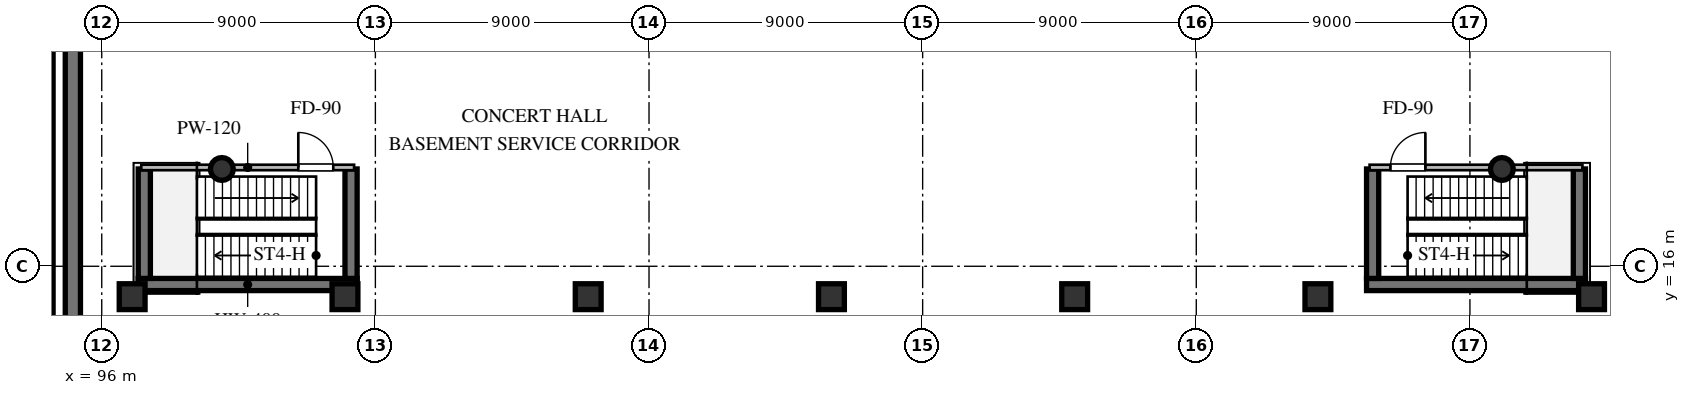
"""IFC4 building model, lengths in metres.
Left out: names, types, materials, properties, quantities, classifications, styles, units other than length and angle.
Written with IfcOpenShell. Run it as: python <this file> out.ifc"""

import sys

from ifc_helpers import new_model, si_unit, direction, frame, frame_2d, origin, origin_2d, place, context, subcontext, project, spatial, rectangle, circle, extrude, element, fill, save


model = new_model("IFC4")
c1 = context("Model", 3, precision=1e-05, world=origin(), true_north=direction((0.0, 1.0)))
c2 = subcontext(c1, "Body", "Model", "MODEL_VIEW")
j1 = project(units=[si_unit("LENGTHUNIT", "METRE"), si_unit("PLANEANGLEUNIT", "RADIAN")], contexts=[c1])
p1 = place(None, origin())
s1 = spatial("IfcSite", under=j1, at=p1, CompositionType="ELEMENT")
p2 = place(p1, origin())
s2 = spatial("IfcBuilding", under=s1, at=p2, CompositionType="ELEMENT")
p3 = place(p2, frame((0.0, 0.0, -5.4)))
s3 = spatial("IfcBuildingStorey", under=s2, at=p3, CompositionType="ELEMENT", Elevation=-5.4)
for number, where, z_axis, x_axis in (
    (1, (94.15, 1.5, 0.0), (0.0, 0.0, 1.0), (0.0, 1.0, 0.0)),
    (2, (95.05, 73.0, 0.0), (0.0, 0.0, 1.0), (0.0, -1.0, 0.0)),
):
    element("IfcWall", number, at=place(p3, frame(where, z_axis=z_axis, x_axis=x_axis)), inside=s3, PredefinedType="SHEAR", context=c2, shape_type="SweptSolid", body=[
        extrude(rectangle(XDim=71.5, YDim=0.5, at=frame_2d((35.75, 0.0))), origin(), (0.0, 0.0, 1.0), 5.2),
    ])
for number, where, z_axis, x_axis in (
    (3, (97.0, 15.0, 0.0), (0.0, 0.0, 1.0), (1.0, 0.0, 0.0)),
    (4, (104.0, 15.0, 0.0), (0.0, 0.0, 1.0), (1.0, 0.0, 0.0)),
    (5, (112.0, 15.0, 0.0), (0.0, 0.0, 1.0), (1.0, 0.0, 0.0)),
    (6, (120.0, 15.0, 0.0), (0.0, 0.0, 1.0), (1.0, 0.0, 0.0)),
    (7, (128.0, 15.0, 0.0), (0.0, 0.0, 1.0), (1.0, 0.0, 0.0)),
    (8, (136.0, 15.0, 0.0), (0.0, 0.0, 1.0), (1.0, 0.0, 0.0)),
    (9, (145.0, 15.0, 0.0), (0.0, 0.0, 1.0), (1.0, 0.0, 0.0)),
):
    element("IfcColumn", number, at=place(p3, frame(where, z_axis=z_axis, x_axis=x_axis)), inside=s3, PredefinedType="COLUMN", context=c2, shape_type="SweptSolid", body=[
        extrude(rectangle(XDim=0.85, YDim=0.85, at=origin_2d()), origin(), (0.0, 0.0, 1.0), 5.4),
    ])
p4 = place(p3, frame((97.2, 15.4, 0.0), z_axis=(0.0, 0.0, 1.0), x_axis=(1.0, 0.0, 0.0)))
e10 = element("IfcWall", 10, at=p4, inside=s3, PredefinedType="SHEAR", context=c2, shape_type="SweptSolid", body=[
    extrude(rectangle(XDim=7.2, YDim=0.4, at=frame_2d((3.6, 0.0))), origin(), (0.0, 0.0, 1.0), 5.12),
])
for number, where, z_axis, x_axis in (
    (11, (97.4, 15.6, 0.0), (0.0, 0.0, 1.0), (0.0, 1.0, 0.0)),
    (12, (104.2, 15.6, 0.0), (0.0, 0.0, 1.0), (0.0, 1.0, 0.0)),
):
    element("IfcWall", number, at=place(p3, frame(where, z_axis=z_axis, x_axis=x_axis)), inside=s3, PredefinedType="SHEAR", context=c2, shape_type="SweptSolid", body=[
        extrude(rectangle(XDim=3.6, YDim=0.4, at=frame_2d((1.8, 0.0))), origin(), (0.0, 0.0, 1.0), 5.12),
    ])
p5 = place(p3, frame((99.95, 19.2, 0.0), z_axis=(0.0, 0.0, 1.0), x_axis=(1.0, 0.0, 0.0)))
e13 = element("IfcColumn", 13, at=p5, inside=s3, PredefinedType="COLUMN", context=c2, shape_type="SweptSolid", body=[
    extrude(circle(Radius=0.375, at=origin_2d()), origin(), (0.0, 0.0, 1.0), 5.4),
])
p6 = place(p3, frame((137.6, 15.4, 0.0), z_axis=(0.0, 0.0, 1.0), x_axis=(1.0, 0.0, 0.0)))
e14 = element("IfcWall", 14, at=p6, inside=s3, PredefinedType="SHEAR", context=c2, shape_type="SweptSolid", body=[
    extrude(rectangle(XDim=7.2, YDim=0.4, at=frame_2d((3.6, 0.0))), origin(), (0.0, 0.0, 1.0), 5.12),
])
for number, where, z_axis, x_axis in (
    (15, (137.8, 15.6, 0.0), (0.0, 0.0, 1.0), (0.0, 1.0, 0.0)),
    (16, (144.6, 15.6, 0.0), (0.0, 0.0, 1.0), (0.0, 1.0, 0.0)),
):
    element("IfcWall", number, at=place(p3, frame(where, z_axis=z_axis, x_axis=x_axis)), inside=s3, PredefinedType="SHEAR", context=c2, shape_type="SweptSolid", body=[
        extrude(rectangle(XDim=3.6, YDim=0.4, at=frame_2d((1.8, 0.0))), origin(), (0.0, 0.0, 1.0), 5.12),
    ])
p7 = place(p3, frame((142.05, 19.2, 0.0), z_axis=(0.0, 0.0, 1.0), x_axis=(1.0, 0.0, 0.0)))
e17 = element("IfcColumn", 17, at=p7, inside=s3, PredefinedType="COLUMN", context=c2, shape_type="SweptSolid", body=[
    extrude(circle(Radius=0.375, at=origin_2d()), origin(), (0.0, 0.0, 1.0), 5.4),
])
p8 = place(p3, frame((97.3, 19.25, 0.0), z_axis=(0.0, 0.0, 1.0), x_axis=(1.0, 0.0, 0.0)))
e18 = element("IfcWall", 18, at=p8, inside=s3, PredefinedType="PARTITIONING", context=c2, shape_type="SweptSolid", body=[
    extrude(rectangle(XDim=7.0, YDim=0.18, at=frame_2d((3.5, 0.0))), origin(), (0.0, 0.0, 1.0), 5.12),
])
p9 = place(p8, frame((5.165, 0.0, 0.0)))
e19 = element("IfcOpeningElement", 19, at=p9, cuts=e18, PredefinedType="OPENING", context=c2, shape_type="SweptSolid", body=[
    extrude(rectangle(XDim=1.15, YDim=2.1, at=frame_2d((0.575, 1.05))), frame((0.0, 0.1, 0.0), z_axis=(0.0, -1.0, 0.0), x_axis=(1.0, 0.0, 0.0)), (0.0, 0.0, 1.0), 0.2),
])
p10 = place(p3, frame((137.7, 19.25, 0.0), z_axis=(0.0, 0.0, 1.0), x_axis=(1.0, 0.0, 0.0)))
e20 = element("IfcWall", 20, at=p10, inside=s3, PredefinedType="PARTITIONING", context=c2, shape_type="SweptSolid", body=[
    extrude(rectangle(XDim=7.0, YDim=0.18, at=frame_2d((3.5, 0.0))), origin(), (0.0, 0.0, 1.0), 5.12),
])
p11 = place(p10, frame((0.685, 0.0, 0.0)))
e21 = element("IfcOpeningElement", 21, at=p11, cuts=e20, PredefinedType="OPENING", context=c2, shape_type="SweptSolid", body=[
    extrude(rectangle(XDim=1.15, YDim=2.1, at=frame_2d((0.575, 1.05))), frame((0.0, 0.1, 0.0), z_axis=(0.0, -1.0, 0.0), x_axis=(1.0, 0.0, 0.0)), (0.0, 0.0, 1.0), 0.2),
])
p12 = place(p9, origin())
e22 = element("IfcDoor", 22, at=p12, inside=s3, OperationType="SINGLE_SWING_LEFT", PredefinedType="DOOR", context=c2, shape_type="SweptSolid", body=[
    extrude(rectangle(XDim=1.15, YDim=2.1, at=frame_2d((0.575, 1.05))), frame((0.0, 0.025, 0.0), z_axis=(0.0, -1.0, 0.0), x_axis=(1.0, 0.0, 0.0)), (0.0, 0.0, 1.0), 0.05),
])
fill(e19, e22)
p13 = place(p11, origin())
e23 = element("IfcDoor", 23, at=p13, inside=s3, OperationType="SINGLE_SWING_RIGHT", PredefinedType="DOOR", context=c2, shape_type="SweptSolid", body=[
    extrude(rectangle(XDim=1.15, YDim=2.1, at=frame_2d((0.575, 1.05))), frame((0.0, 0.025, 0.0), z_axis=(0.0, -1.0, 0.0), x_axis=(1.0, 0.0, 0.0)), (0.0, 0.0, 1.0), 0.05),
])
fill(e21, e23)
save(model, sys.argv[1])
